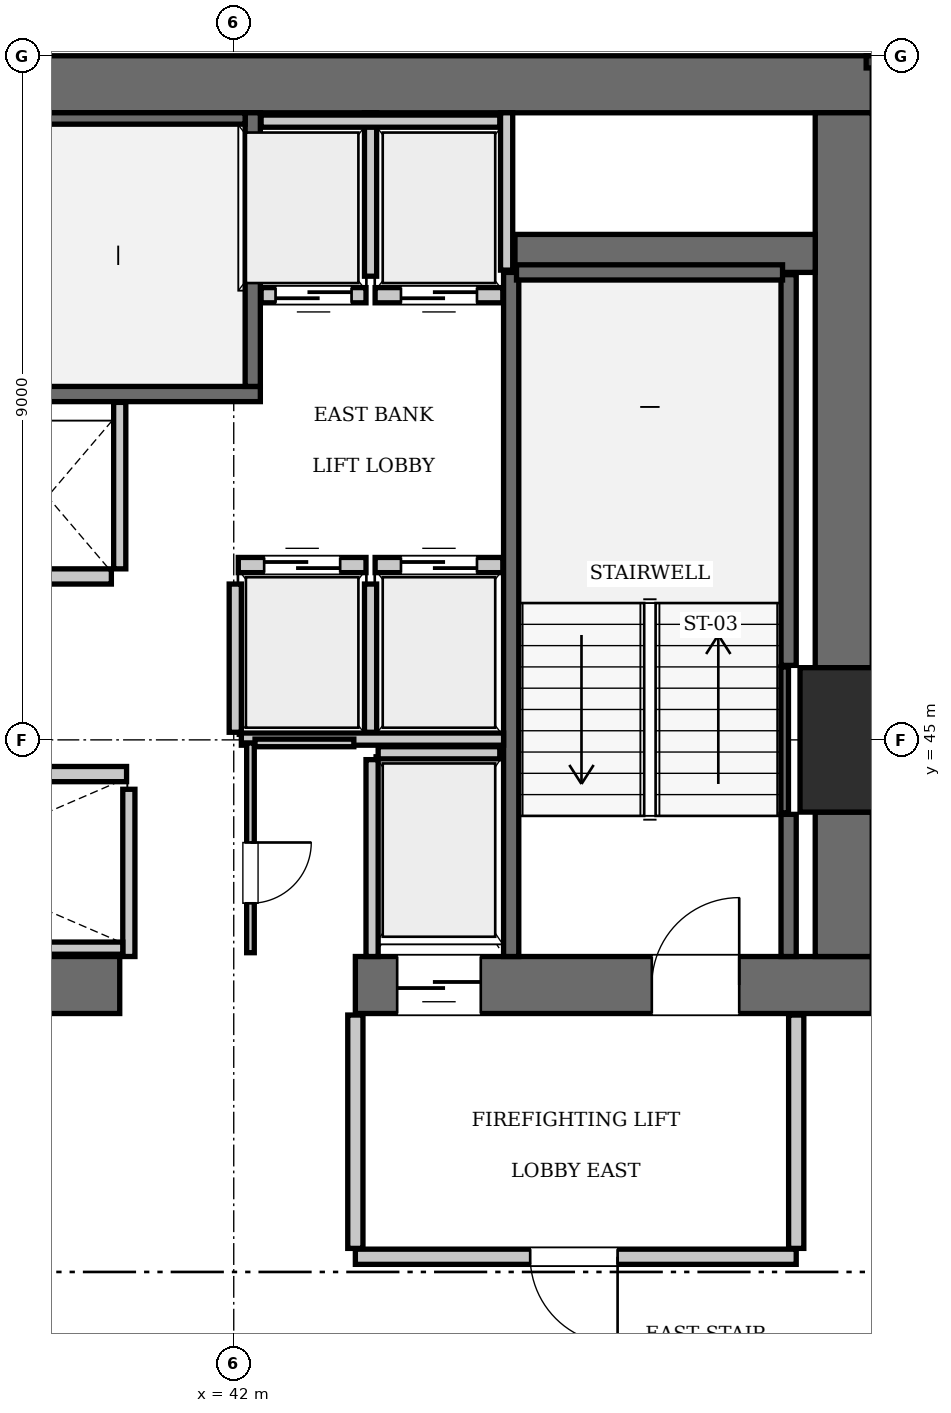
"""IFC4 building model, lengths in metres.
Left out: names, types, materials, properties, quantities, classifications, styles, units other than length and angle.
Written with IfcOpenShell. Run it as: python <this file> out.ifc"""

import sys

from ifc_helpers import new_model, si_unit, direction, frame, frame_2d, origin, origin_2d, place, context, subcontext, project, spatial, rectangle, extrude, element, fill, save


model = new_model("IFC4")
c1 = context("Model", 3, precision=1e-05, world=origin(), true_north=direction((0.0, 1.0)))
c2 = subcontext(c1, "Body", "Model", "MODEL_VIEW")
j1 = project(units=[si_unit("LENGTHUNIT", "METRE"), si_unit("PLANEANGLEUNIT", "RADIAN")], contexts=[c1])
p1 = place(None, origin())
s1 = spatial("IfcSite", under=j1, at=p1, CompositionType="ELEMENT")
p2 = place(p1, origin())
s2 = spatial("IfcBuilding", under=s1, at=p2, CompositionType="ELEMENT")
p3 = place(p2, frame((0.0, 0.0, 200.55)))
s3 = spatial("IfcBuildingStorey", under=s2, at=p3, CompositionType="ELEMENT", Elevation=200.55)
p4 = place(p3, frame((50.4, 45.0, 0.0), z_axis=(0.0, 0.0, 1.0), x_axis=(1.0, 0.0, 0.0)))
e1 = element("IfcColumn", 1, at=p4, inside=s3, PredefinedType="COLUMN", context=c2, shape_type="SweptSolid", body=[
    extrude(rectangle(XDim=1.9, YDim=1.9, at=origin_2d()), origin(), (0.0, 0.0, 1.0), 3.85),
])
p5 = place(p3, frame((25.2, 53.625, 0.0), z_axis=(0.0, 0.0, 1.0), x_axis=(1.0, 0.0, 0.0)))
e2 = element("IfcWall", 2, at=p5, inside=s3, PredefinedType="SHEAR", context=c2, shape_type="SweptSolid", body=[
    extrude(rectangle(XDim=25.2, YDim=0.75, at=frame_2d((12.6, 0.0))), origin(), (0.0, 0.0, 1.0), 3.85),
])
p6 = place(p3, frame((35.1, 41.775, 0.0), z_axis=(0.0, 0.0, 1.0), x_axis=(1.0, 0.0, 0.0)))
e3 = element("IfcWall", 3, at=p6, inside=s3, PredefinedType="SHEAR", context=c2, shape_type="SweptSolid", body=[
    extrude(rectangle(XDim=5.4, YDim=0.75, at=frame_2d((2.7, 0.0))), origin(), (0.0, 0.0, 1.0), 3.85),
])
p7 = place(p3, frame((43.6, 41.775, 0.0), z_axis=(0.0, 0.0, 1.0), x_axis=(1.0, 0.0, 0.0)))
e4 = element("IfcWall", 4, at=p7, inside=s3, PredefinedType="SHEAR", context=c2, shape_type="SweptSolid", body=[
    extrude(rectangle(XDim=6.8, YDim=0.75, at=frame_2d((3.4, 0.0))), origin(), (0.0, 0.0, 1.0), 3.85),
])
p8 = place(p7, frame((3.9, 0.0, 0.0)))
e5 = element("IfcOpeningElement", 5, at=p8, cuts=e4, PredefinedType="OPENING", context=c2, shape_type="SweptSolid", body=[
    extrude(rectangle(XDim=1.15, YDim=2.15, at=frame_2d((0.575, 1.075))), frame((0.0, 0.385, 0.0), z_axis=(0.0, -1.0, 0.0), x_axis=(1.0, 0.0, 0.0)), (0.0, 0.0, 1.0), 0.77),
])
p9 = place(p7, frame((0.55, 0.0, 0.0)))
e6 = element("IfcOpeningElement", 6, at=p9, cuts=e4, PredefinedType="OPENING", context=c2, shape_type="SweptSolid", body=[
    extrude(rectangle(XDim=1.1, YDim=2.2, at=frame_2d((0.55, 1.1))), frame((0.0, 0.385, 0.0), z_axis=(0.0, -1.0, 0.0), x_axis=(1.0, 0.0, 0.0)), (0.0, 0.0, 1.0), 0.77),
])
p10 = place(p3, frame((50.025, 42.15, 0.0), z_axis=(0.0, 0.0, 1.0), x_axis=(0.0, 1.0, 0.0)))
e7 = element("IfcWall", 7, at=p10, inside=s3, PredefinedType="SHEAR", context=c2, shape_type="SweptSolid", body=[
    extrude(rectangle(XDim=1.9, YDim=0.75, at=frame_2d((0.95, 0.0))), origin(), (0.0, 0.0, 1.0), 3.85),
])
p11 = place(p3, frame((50.025, 45.95, 0.0), z_axis=(0.0, 0.0, 1.0), x_axis=(0.0, 1.0, 0.0)))
e8 = element("IfcWall", 8, at=p11, inside=s3, PredefinedType="SHEAR", context=c2, shape_type="SweptSolid", body=[
    extrude(rectangle(XDim=7.3, YDim=0.75, at=frame_2d((3.65, 0.0))), origin(), (0.0, 0.0, 1.0), 3.85),
])
p12 = place(p3, frame((45.7, 51.4, 0.0), z_axis=(0.0, 0.0, 1.0), x_axis=(1.0, 0.0, 0.0)))
e9 = element("IfcWall", 9, at=p12, inside=s3, PredefinedType="SHEAR", context=c2, shape_type="SweptSolid", body=[
    extrude(rectangle(XDim=3.95, YDim=0.5, at=frame_2d((1.975, 0.0))), origin(), (0.0, 0.0, 1.0), 3.85),
])
p13 = place(p3, frame((33.25, 49.55, 0.0), z_axis=(0.0, 0.0, 1.0), x_axis=(1.0, 0.0, 0.0)))
e10 = element("IfcWall", 10, at=p13, inside=s3, PredefinedType="SOLIDWALL", context=c2, shape_type="SweptSolid", body=[
    extrude(rectangle(XDim=9.1, YDim=0.2, at=frame_2d((4.55, 0.0))), origin(), (0.0, 0.0, 1.0), 3.61),
])
p14 = place(p3, frame((42.25, 49.65, 0.0), z_axis=(0.0, 0.0, 1.0), x_axis=(0.0, 1.0, 0.0)))
e11 = element("IfcWall", 11, at=p14, inside=s3, PredefinedType="SOLIDWALL", context=c2, shape_type="SweptSolid", body=[
    extrude(rectangle(XDim=3.6, YDim=0.2, at=frame_2d((1.8, 0.0))), origin(), (0.0, 0.0, 1.0), 3.61),
])
p15 = place(p3, frame((33.45, 53.175, 0.0), z_axis=(0.0, 0.0, 1.0), x_axis=(1.0, 0.0, 0.0)))
e12 = element("IfcWall", 12, at=p15, inside=s3, PredefinedType="SOLIDWALL", context=c2, shape_type="SweptSolid", body=[
    extrude(rectangle(XDim=8.7, YDim=0.15, at=frame_2d((4.35, 0.0))), origin(), (0.0, 0.0, 1.0), 3.61),
])
p16 = place(p3, frame((45.65, 42.15, 0.0), z_axis=(0.0, 0.0, 1.0), x_axis=(0.0, 1.0, 0.0)))
e13 = element("IfcWall", 13, at=p16, inside=s3, PredefinedType="SOLIDWALL", context=c2, shape_type="SweptSolid", body=[
    extrude(rectangle(XDim=9.0, YDim=0.2, at=frame_2d((4.5, 0.0))), origin(), (0.0, 0.0, 1.0), 3.61),
])
p17 = place(p3, frame((49.3, 42.15, 0.0), z_axis=(0.0, 0.0, 1.0), x_axis=(0.0, 1.0, 0.0)))
e14 = element("IfcWall", 14, at=p17, inside=s3, PredefinedType="SOLIDWALL", context=c2, shape_type="SweptSolid", body=[
    extrude(rectangle(XDim=1.87, YDim=0.2, at=frame_2d((0.935, 0.0))), origin(), (0.0, 0.0, 1.0), 3.61),
])
p18 = place(p3, frame((49.3, 45.98, 0.0), z_axis=(0.0, 0.0, 1.0), x_axis=(0.0, 1.0, 0.0)))
e15 = element("IfcWall", 15, at=p18, inside=s3, PredefinedType="SOLIDWALL", context=c2, shape_type="SweptSolid", body=[
    extrude(rectangle(XDim=5.14, YDim=0.2, at=frame_2d((2.57, 0.0))), origin(), (0.0, 0.0, 1.0), 3.61),
])
p19 = place(p3, frame((45.72, 51.15, 0.0), z_axis=(0.0, 0.0, 1.0), x_axis=(1.0, 0.0, 0.0)))
e16 = element("IfcWall", 16, at=p19, inside=s3, PredefinedType="SOLIDWALL", context=c2, shape_type="SweptSolid", body=[
    extrude(rectangle(XDim=3.5, YDim=0.2, at=frame_2d((1.75, 0.0))), origin(), (0.0, 0.0, 1.0), 3.61),
])
p20 = place(p3, frame((49.248, 44.04, 0.0), z_axis=(0.0, 0.0, 1.0), x_axis=(0.0, 1.0, 0.0)))
e17 = element("IfcWall", 17, at=p20, inside=s3, PredefinedType="SOLIDWALL", context=c2, shape_type="SweptSolid", body=[
    extrude(rectangle(XDim=1.92, YDim=0.1, at=frame_2d((0.96, 0.0))), origin(), (0.0, 0.0, 1.0), 3.61),
])
p21 = place(p3, frame((42.06, 47.3, 0.0), z_axis=(0.0, 0.0, 1.0), x_axis=(1.0, 0.0, 0.0)))
e18 = element("IfcWall", 18, at=p21, inside=s3, PredefinedType="SOLIDWALL", context=c2, shape_type="SweptSolid", body=[
    extrude(rectangle(XDim=1.68, YDim=0.2, at=frame_2d((0.84, 0.0))), origin(), (0.0, 0.0, 1.0), 3.61),
])
p22 = place(p21, frame((0.34, 0.0, 0.0)))
e19 = element("IfcOpeningElement", 19, at=p22, cuts=e18, PredefinedType="OPENING", context=c2, shape_type="SweptSolid", body=[
    extrude(rectangle(XDim=1.0, YDim=2.15, at=frame_2d((0.5, 1.075))), frame((0.0, 0.11, 0.0), z_axis=(0.0, -1.0, 0.0), x_axis=(1.0, 0.0, 0.0)), (0.0, 0.0, 1.0), 0.22),
])
p23 = place(p3, frame((43.86, 47.3, 0.0), z_axis=(0.0, 0.0, 1.0), x_axis=(1.0, 0.0, 0.0)))
e20 = element("IfcWall", 20, at=p23, inside=s3, PredefinedType="SOLIDWALL", context=c2, shape_type="SweptSolid", body=[
    extrude(rectangle(XDim=1.68, YDim=0.2, at=frame_2d((0.84, 0.0))), origin(), (0.0, 0.0, 1.0), 3.61),
])
p24 = place(p23, frame((0.34, 0.0, 0.0)))
e21 = element("IfcOpeningElement", 21, at=p24, cuts=e20, PredefinedType="OPENING", context=c2, shape_type="SweptSolid", body=[
    extrude(rectangle(XDim=1.0, YDim=2.15, at=frame_2d((0.5, 1.075))), frame((0.0, 0.11, 0.0), z_axis=(0.0, -1.0, 0.0), x_axis=(1.0, 0.0, 0.0)), (0.0, 0.0, 1.0), 0.22),
])
p25 = place(p3, frame((42.36, 50.85, 0.0), z_axis=(0.0, 0.0, 1.0), x_axis=(1.0, 0.0, 0.0)))
e22 = element("IfcWall", 22, at=p25, inside=s3, PredefinedType="SOLIDWALL", context=c2, shape_type="SweptSolid", body=[
    extrude(rectangle(XDim=1.38, YDim=0.2, at=frame_2d((0.69, 0.0))), origin(), (0.0, 0.0, 1.0), 3.61),
])
p26 = place(p25, frame((0.19, 0.0, 0.0)))
e23 = element("IfcOpeningElement", 23, at=p26, cuts=e22, PredefinedType="OPENING", context=c2, shape_type="SweptSolid", body=[
    extrude(rectangle(XDim=1.0, YDim=2.15, at=frame_2d((0.5, 1.075))), frame((0.0, 0.11, 0.0), z_axis=(0.0, -1.0, 0.0), x_axis=(1.0, 0.0, 0.0)), (0.0, 0.0, 1.0), 0.22),
])
p27 = place(p3, frame((43.86, 50.85, 0.0), z_axis=(0.0, 0.0, 1.0), x_axis=(1.0, 0.0, 0.0)))
e24 = element("IfcWall", 24, at=p27, inside=s3, PredefinedType="SOLIDWALL", context=c2, shape_type="SweptSolid", body=[
    extrude(rectangle(XDim=1.68, YDim=0.2, at=frame_2d((0.84, 0.0))), origin(), (0.0, 0.0, 1.0), 3.61),
])
p28 = place(p27, frame((0.34, 0.0, 0.0)))
e25 = element("IfcOpeningElement", 25, at=p28, cuts=e24, PredefinedType="OPENING", context=c2, shape_type="SweptSolid", body=[
    extrude(rectangle(XDim=1.0, YDim=2.15, at=frame_2d((0.5, 1.075))), frame((0.0, 0.11, 0.0), z_axis=(0.0, -1.0, 0.0), x_axis=(1.0, 0.0, 0.0)), (0.0, 0.0, 1.0), 0.22),
])
p29 = place(p3, frame((38.91, 44.55, 0.0), z_axis=(0.0, 0.0, 1.0), x_axis=(1.0, 0.0, 0.0)))
e26 = element("IfcWall", 26, at=p29, inside=s3, PredefinedType="SOLIDWALL", context=c2, shape_type="SweptSolid", body=[
    extrude(rectangle(XDim=1.68, YDim=0.2, at=frame_2d((0.84, 0.0))), origin(), (0.0, 0.0, 1.0), 3.61),
])
p30 = place(p3, frame((38.71, 47.15, 0.0), z_axis=(0.0, 0.0, 1.0), x_axis=(1.0, 0.0, 0.0)))
e27 = element("IfcWall", 27, at=p30, inside=s3, PredefinedType="SOLIDWALL", context=c2, shape_type="SweptSolid", body=[
    extrude(rectangle(XDim=1.68, YDim=0.2, at=frame_2d((0.84, 0.0))), origin(), (0.0, 0.0, 1.0), 3.61),
])
p31 = place(p3, frame((43.9, 44.83, 0.0), z_axis=(0.0, 0.0, 1.0), x_axis=(1.0, 0.0, 0.0)))
e28 = element("IfcWall", 28, at=p31, inside=s3, PredefinedType="SOLIDWALL", context=c2, shape_type="SweptSolid", body=[
    extrude(rectangle(XDim=1.6, YDim=0.16, at=frame_2d((0.8, 0.0))), origin(), (0.0, 0.0, 1.0), 3.61),
])
p32 = place(p3, frame((43.82, 42.15, 0.0), z_axis=(0.0, 0.0, 1.0), x_axis=(0.0, 1.0, 0.0)))
e29 = element("IfcWall", 29, at=p32, inside=s3, PredefinedType="SOLIDWALL", context=c2, shape_type="SweptSolid", body=[
    extrude(rectangle(XDim=2.59, YDim=0.16, at=frame_2d((1.295, 0.0))), origin(), (0.0, 0.0, 1.0), 3.61),
])
for number, where, z_axis, x_axis in (
    (30, (42.02, 45.1, 0.0), (0.0, 0.0, 1.0), (0.0, 1.0, 0.0)),
    (31, (43.8, 45.1, 0.0), (0.0, 0.0, 1.0), (0.0, 1.0, 0.0)),
):
    element("IfcWall", number, at=place(p3, frame(where, z_axis=z_axis, x_axis=x_axis)), inside=s3, PredefinedType="SOLIDWALL", context=c2, shape_type="SweptSolid", body=[
        extrude(rectangle(XDim=1.95, YDim=0.16, at=frame_2d((0.975, 0.0))), origin(), (0.0, 0.0, 1.0), 3.61),
    ])
p33 = place(p3, frame((42.1, 45.01, 0.0), z_axis=(0.0, 0.0, 1.0), x_axis=(1.0, 0.0, 0.0)))
e32 = element("IfcWall", 32, at=p33, inside=s3, PredefinedType="SOLIDWALL", context=c2, shape_type="SweptSolid", body=[
    extrude(rectangle(XDim=3.45, YDim=0.16, at=frame_2d((1.725, 0.0))), origin(), (0.0, 0.0, 1.0), 3.61),
])
p34 = place(p3, frame((45.59, 51.18, 0.0), z_axis=(0.0, 0.0, 1.0), x_axis=(0.0, 1.0, 0.0)))
e33 = element("IfcWall", 33, at=p34, inside=s3, PredefinedType="SOLIDWALL", context=c2, shape_type="SweptSolid", body=[
    extrude(rectangle(XDim=2.07, YDim=0.16, at=frame_2d((1.035, 0.0))), origin(), (0.0, 0.0, 1.0), 3.61),
])
p35 = place(p3, frame((43.8, 51.1, 0.0), z_axis=(0.0, 0.0, 1.0), x_axis=(0.0, 1.0, 0.0)))
e34 = element("IfcWall", 34, at=p35, inside=s3, PredefinedType="SOLIDWALL", context=c2, shape_type="SweptSolid", body=[
    extrude(rectangle(XDim=2.15, YDim=0.16, at=frame_2d((1.075, 0.0))), origin(), (0.0, 0.0, 1.0), 3.61),
])
p36 = place(p3, frame((42.36, 53.14, 0.0), z_axis=(0.0, 0.0, 1.0), x_axis=(1.0, 0.0, 0.0)))
e35 = element("IfcWall", 35, at=p36, inside=s3, PredefinedType="SOLIDWALL", context=c2, shape_type="SweptSolid", body=[
    extrude(rectangle(XDim=3.14, YDim=0.16, at=frame_2d((1.57, 0.0))), origin(), (0.0, 0.0, 1.0), 3.61),
])
p37 = place(p3, frame((40.62, 42.15, 0.0), z_axis=(0.0, 0.0, 1.0), x_axis=(0.0, 1.0, 0.0)))
e36 = element("IfcWall", 36, at=p37, inside=s3, PredefinedType="SOLIDWALL", context=c2, shape_type="SweptSolid", body=[
    extrude(rectangle(XDim=2.2, YDim=0.16, at=frame_2d((1.1, 0.0))), origin(), (0.0, 0.0, 1.0), 3.61),
])
p38 = place(p3, frame((35.52, 42.26, 0.0), z_axis=(0.0, 0.0, 1.0), x_axis=(1.0, 0.0, 0.0)))
e37 = element("IfcWall", 37, at=p38, inside=s3, PredefinedType="SOLIDWALL", context=c2, shape_type="SweptSolid", body=[
    extrude(rectangle(XDim=5.02, YDim=0.16, at=frame_2d((2.51, 0.0))), origin(), (0.0, 0.0, 1.0), 3.61),
])
p39 = place(p3, frame((40.5, 47.25, 0.0), z_axis=(0.0, 0.0, 1.0), x_axis=(0.0, 1.0, 0.0)))
e38 = element("IfcWall", 38, at=p39, inside=s3, PredefinedType="SOLIDWALL", context=c2, shape_type="SweptSolid", body=[
    extrude(rectangle(XDim=2.19, YDim=0.16, at=frame_2d((1.095, 0.0))), origin(), (0.0, 0.0, 1.0), 3.61),
])
p40 = place(p3, frame((43.6, 38.2, 0.0), z_axis=(0.0, 0.0, 1.0), x_axis=(1.0, 0.0, 0.0)))
e39 = element("IfcWall", 39, at=p40, inside=s3, PredefinedType="PARTITIONING", context=c2, shape_type="SweptSolid", body=[
    extrude(rectangle(XDim=5.8, YDim=0.2, at=frame_2d((2.9, 0.0))), origin(), (0.0, 0.0, 1.0), 3.61),
])
p41 = place(p40, frame((2.3, 0.0, 0.0)))
e40 = element("IfcOpeningElement", 40, at=p41, cuts=e39, PredefinedType="OPENING", context=c2, shape_type="SweptSolid", body=[
    extrude(rectangle(XDim=1.15, YDim=2.15, at=frame_2d((0.575, 1.075))), frame((0.0, 0.11, 0.0), z_axis=(0.0, -1.0, 0.0), x_axis=(1.0, 0.0, 0.0)), (0.0, 0.0, 1.0), 0.22),
])
for number, where, z_axis, x_axis in (
    (41, (43.6, 38.31, 0.0), (0.0, 0.0, 1.0), (0.0, 1.0, 0.0)),
    (42, (49.4, 38.31, 0.0), (0.0, 0.0, 1.0), (0.0, 1.0, 0.0)),
):
    element("IfcWall", number, at=place(p3, frame(where, z_axis=z_axis, x_axis=x_axis)), inside=s3, PredefinedType="PARTITIONING", context=c2, shape_type="SweptSolid", body=[
        extrude(rectangle(XDim=3.07, YDim=0.2, at=frame_2d((1.535, 0.0))), origin(), (0.0, 0.0, 1.0), 3.61),
    ])
p42 = place(p3, frame((42.22, 42.2, 0.0), z_axis=(0.0, 0.0, 1.0), x_axis=(0.0, 1.0, 0.0)))
e43 = element("IfcWall", 43, at=p42, inside=s3, PredefinedType="PARTITIONING", context=c2, shape_type="SweptSolid", body=[
    extrude(rectangle(XDim=2.76, YDim=0.1, at=frame_2d((1.38, 0.0))), origin(), (0.0, 0.0, 1.0), 3.61),
])
p43 = place(p42, frame((0.65, 0.0, 0.0)))
e44 = element("IfcOpeningElement", 44, at=p43, cuts=e43, PredefinedType="OPENING", context=c2, shape_type="SweptSolid", body=[
    extrude(rectangle(XDim=0.8, YDim=2.05, at=frame_2d((0.4, 1.025))), frame((0.0, 0.06, 0.0), z_axis=(0.0, -1.0, 0.0), x_axis=(1.0, 0.0, 0.0)), (0.0, 0.0, 1.0), 0.12),
])
p44 = place(p3, frame((42.28, 44.96, 0.0), z_axis=(0.0, 0.0, 1.0), x_axis=(1.0, 0.0, 0.0)))
e45 = element("IfcWall", 45, at=p44, inside=s3, PredefinedType="PARTITIONING", context=c2, shape_type="SweptSolid", body=[
    extrude(rectangle(XDim=1.3, YDim=0.1, at=frame_2d((0.65, 0.0))), origin(), (0.0, 0.0, 1.0), 3.61),
])
p45 = place(p8, origin())
e46 = element("IfcDoor", 46, at=p45, inside=s3, OperationType="SINGLE_SWING_RIGHT", PredefinedType="DOOR", context=c2, shape_type="SweptSolid", body=[
    extrude(rectangle(XDim=1.15, YDim=2.15, at=frame_2d((0.575, 1.075))), frame((0.0, 0.025, 0.0), z_axis=(0.0, -1.0, 0.0), x_axis=(1.0, 0.0, 0.0)), (0.0, 0.0, 1.0), 0.05),
])
fill(e5, e46)
p46 = place(p22, origin())
e47 = element("IfcDoor", 47, at=p46, inside=s3, OperationType="SLIDING_TO_LEFT", PredefinedType="DOOR", context=c2, shape_type="SweptSolid", body=[
    extrude(rectangle(XDim=1.0, YDim=2.15, at=frame_2d((0.5, 1.075))), frame((0.0, 0.025, 0.0), z_axis=(0.0, -1.0, 0.0), x_axis=(1.0, 0.0, 0.0)), (0.0, 0.0, 1.0), 0.05),
])
fill(e19, e47)
p47 = place(p24, origin())
e48 = element("IfcDoor", 48, at=p47, inside=s3, OperationType="SLIDING_TO_LEFT", PredefinedType="DOOR", context=c2, shape_type="SweptSolid", body=[
    extrude(rectangle(XDim=1.0, YDim=2.15, at=frame_2d((0.5, 1.075))), frame((0.0, 0.025, 0.0), z_axis=(0.0, -1.0, 0.0), x_axis=(1.0, 0.0, 0.0)), (0.0, 0.0, 1.0), 0.05),
])
fill(e21, e48)
p48 = place(p26, frame((1.0, 0.0, 0.0), z_axis=(0.0, 0.0, 1.0), x_axis=(-1.0, 0.0, 0.0)))
e49 = element("IfcDoor", 49, at=p48, inside=s3, OperationType="SLIDING_TO_LEFT", PredefinedType="DOOR", context=c2, shape_type="SweptSolid", body=[
    extrude(rectangle(XDim=1.0, YDim=2.15, at=frame_2d((0.5, 1.075))), frame((0.0, 0.025, 0.0), z_axis=(0.0, -1.0, 0.0), x_axis=(1.0, 0.0, 0.0)), (0.0, 0.0, 1.0), 0.05),
])
fill(e23, e49)
p49 = place(p28, frame((1.0, 0.0, 0.0), z_axis=(0.0, 0.0, 1.0), x_axis=(-1.0, 0.0, 0.0)))
e50 = element("IfcDoor", 50, at=p49, inside=s3, OperationType="SLIDING_TO_LEFT", PredefinedType="DOOR", context=c2, shape_type="SweptSolid", body=[
    extrude(rectangle(XDim=1.0, YDim=2.15, at=frame_2d((0.5, 1.075))), frame((0.0, 0.025, 0.0), z_axis=(0.0, -1.0, 0.0), x_axis=(1.0, 0.0, 0.0)), (0.0, 0.0, 1.0), 0.05),
])
fill(e25, e50)
p50 = place(p9, frame((1.1, 0.0, 0.0), z_axis=(0.0, 0.0, 1.0), x_axis=(-1.0, 0.0, 0.0)))
e51 = element("IfcDoor", 51, at=p50, inside=s3, OperationType="SLIDING_TO_LEFT", PredefinedType="DOOR", context=c2, shape_type="SweptSolid", body=[
    extrude(rectangle(XDim=1.1, YDim=2.2, at=frame_2d((0.55, 1.1))), frame((0.0, 0.025, 0.0), z_axis=(0.0, -1.0, 0.0), x_axis=(1.0, 0.0, 0.0)), (0.0, 0.0, 1.0), 0.05),
])
fill(e6, e51)
p51 = place(p41, frame((1.15, 0.0, 0.0), z_axis=(0.0, 0.0, 1.0), x_axis=(-1.0, 0.0, 0.0)))
e52 = element("IfcDoor", 52, at=p51, inside=s3, OperationType="SINGLE_SWING_LEFT", PredefinedType="DOOR", context=c2, shape_type="SweptSolid", body=[
    extrude(rectangle(XDim=1.15, YDim=2.15, at=frame_2d((0.575, 1.075))), frame((0.0, 0.025, 0.0), z_axis=(0.0, -1.0, 0.0), x_axis=(1.0, 0.0, 0.0)), (0.0, 0.0, 1.0), 0.05),
])
fill(e40, e52)
p52 = place(p43, frame((0.8, 0.0, 0.0), z_axis=(0.0, 0.0, 1.0), x_axis=(-1.0, 0.0, 0.0)))
e53 = element("IfcDoor", 53, at=p52, inside=s3, OperationType="SINGLE_SWING_LEFT", PredefinedType="DOOR", context=c2, shape_type="SweptSolid", body=[
    extrude(rectangle(XDim=0.8, YDim=2.05, at=frame_2d((0.4, 1.025))), frame((0.0, 0.025, 0.0), z_axis=(0.0, -1.0, 0.0), x_axis=(1.0, 0.0, 0.0)), (0.0, 0.0, 1.0), 0.05),
])
fill(e44, e53)
save(model, sys.argv[1])
